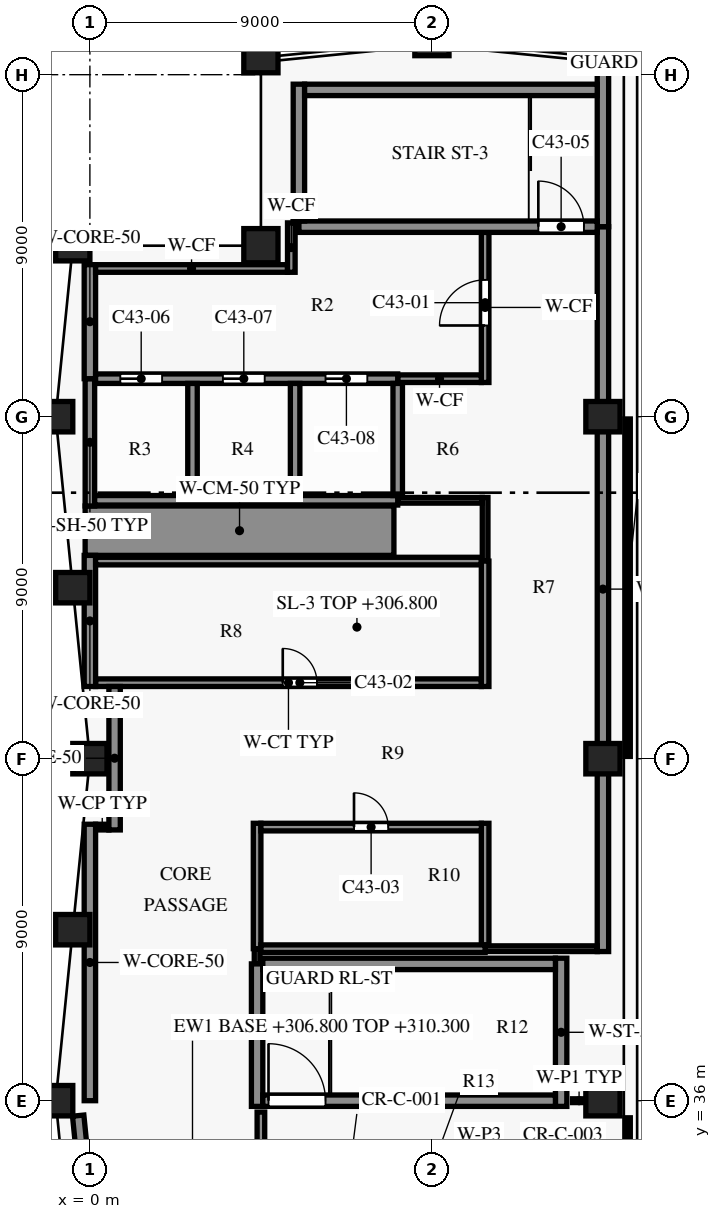
"""IFC4 building model, lengths in metres.
Left out: names, types, materials, properties, quantities, classifications, styles, units other than length and angle.
Written with IfcOpenShell. Run it as: python <this file> out.ifc"""

import sys

from ifc_helpers import new_model, si_unit, direction, frame, frame_2d, origin, origin_2d, place, context, subcontext, project, spatial, rectangle, extrude, element, fill, save


model = new_model("IFC4")
c1 = context("Model", 3, precision=1e-05, world=origin(), true_north=direction((0.0, 1.0)))
c2 = subcontext(c1, "Body", "Model", "MODEL_VIEW")
j1 = project(units=[si_unit("LENGTHUNIT", "METRE"), si_unit("PLANEANGLEUNIT", "RADIAN")], contexts=[c1])
p1 = place(None, origin())
s1 = spatial("IfcSite", under=j1, at=p1, CompositionType="ELEMENT")
p2 = place(p1, origin())
s2 = spatial("IfcBuilding", under=s1, at=p2, CompositionType="ELEMENT")
p3 = place(p2, frame((0.0, 0.0, 306.8)))
s3 = spatial("IfcBuildingStorey", under=s2, at=p3, CompositionType="ELEMENT", Elevation=306.8)
for number, where, z_axis, x_axis in (
    (1, (13.5, 36.0, 0.0), (0.0, 0.0, 1.0), (1.0, 0.0, 0.0)),
    (2, (13.5, 45.0, 0.0), (0.0, 0.0, 1.0), (1.0, 0.0, 0.0)),
    (3, (13.5, 54.0, 0.0), (0.0, 0.0, 1.0), (1.0, 0.0, 0.0)),
    (4, (13.5, 63.45, 0.0), (0.0, 0.0, 1.0), (-0.995, 0.1, 0.0)),
    (5, (9.0, 63.9, 0.0), (0.0, 0.0, 1.0), (-1.0, 0.0, 0.0)),
    (6, (4.5, 63.45, 0.0), (0.0, 0.0, 1.0), (-0.995, -0.1, 0.0)),
    (7, (-0.45, 58.5, 0.0), (0.0, 0.0, 1.0), (-0.1, -0.995, 0.0)),
    (8, (-0.9, 54.0, 0.0), (0.0, 0.0, 1.0), (0.0, -1.0, 0.0)),
    (9, (-0.45, 49.5, 0.0), (0.0, 0.0, 1.0), (0.1, -0.995, 0.0)),
    (10, (0.0, 45.0, 0.0), (0.0, 0.0, 1.0), (0.0, -1.0, 0.0)),
    (11, (-0.45, 40.5, 0.0), (0.0, 0.0, 1.0), (-0.1, -0.995, 0.0)),
    (12, (-0.9, 36.0, 0.0), (0.0, 0.0, 1.0), (0.0, -1.0, 0.0)),
):
    element("IfcColumn", number, at=place(p3, frame(where, z_axis=z_axis, x_axis=x_axis)), inside=s3, PredefinedType="COLUMN", context=c2, shape_type="SweptSolid", body=[
        extrude(rectangle(XDim=0.9, YDim=0.8, at=origin_2d()), origin(), (0.0, 0.0, 1.0), 4.0),
    ])
p4 = place(p3, frame((4.5, 58.5, 0.0), z_axis=(0.0, 0.0, 1.0), x_axis=(1.0, 0.0, 0.0)))
e13 = element("IfcColumn", 13, at=p4, inside=s3, PredefinedType="COLUMN", context=c2, shape_type="SweptSolid", body=[
    extrude(rectangle(XDim=0.9, YDim=0.9, at=origin_2d()), origin(), (0.0, 0.0, 1.0), 4.0),
])
p5 = place(p3, frame((0.061, 31.915, 0.0), z_axis=(0.0, 0.0, 1.0), x_axis=(-0.099549320092, 0.995032629048, 0.0)))
e14 = element("IfcWall", 14, at=p5, inside=s3, PredefinedType="SOLIDWALL", context=c2, shape_type="SweptSolid", body=[
    extrude(rectangle(XDim=3.71, YDim=0.3, at=frame_2d((1.855, 0.0))), origin(), (0.0, 0.0, 1.0), 3.5),
])
p6 = place(p3, frame((4.55, 36.0, 0.0), z_axis=(0.0, 0.0, 1.0), x_axis=(1.0, 0.0, 0.0)))
e15 = element("IfcWall", 15, at=p6, inside=s3, PredefinedType="SHEAR", context=c2, shape_type="SweptSolid", body=[
    extrude(rectangle(XDim=7.7, YDim=0.3, at=frame_2d((3.85, 0.0))), origin(), (0.0, 0.0, 1.0), 3.7),
])
p7 = place(p6, frame((0.15, 0.0, 0.0)))
e16 = element("IfcOpeningElement", 16, at=p7, cuts=e15, PredefinedType="OPENING", context=c2, shape_type="SweptSolid", body=[
    extrude(rectangle(XDim=1.5, YDim=2.2, at=frame_2d((0.75, 1.1))), frame((0.0, 0.16, 0.0), z_axis=(0.0, -1.0, 0.0), x_axis=(1.0, 0.0, 0.0)), (0.0, 0.0, 1.0), 0.32),
])
p8 = place(p3, frame((4.55, 39.6, 0.0), z_axis=(0.0, 0.0, 1.0), x_axis=(1.0, 0.0, 0.0)))
e17 = element("IfcWall", 17, at=p8, inside=s3, PredefinedType="SHEAR", context=c2, shape_type="SweptSolid", body=[
    extrude(rectangle(XDim=7.7, YDim=0.3, at=frame_2d((3.85, 0.0))), origin(), (0.0, 0.0, 1.0), 3.7),
])
p9 = place(p3, frame((10.4, 40.0, 0.0), z_axis=(0.0, 0.0, 1.0), x_axis=(1.0, 0.0, 0.0)))
e18 = element("IfcWall", 18, at=p9, inside=s3, PredefinedType="PARTITIONING", context=c2, shape_type="SweptSolid", body=[
    extrude(rectangle(XDim=2.95, YDim=0.15, at=frame_2d((1.475, 0.0))), origin(), (0.0, 0.0, 1.0), 3.7),
])
p10 = place(p3, frame((4.5, 40.0, 0.0), z_axis=(0.0, 0.0, 1.0), x_axis=(1.0, 0.0, 0.0)))
e19 = element("IfcWall", 19, at=p10, inside=s3, PredefinedType="PARTITIONING", context=c2, shape_type="SweptSolid", body=[
    extrude(rectangle(XDim=5.9, YDim=0.2, at=frame_2d((2.95, 0.0))), origin(), (0.0, 0.0, 1.0), 3.7),
])
p11 = place(p3, frame((0.15, 43.2, 0.0), z_axis=(0.0, 0.0, 1.0), x_axis=(1.0, 0.0, 0.0)))
e20 = element("IfcWall", 20, at=p11, inside=s3, PredefinedType="PARTITIONING", context=c2, shape_type="SweptSolid", body=[
    extrude(rectangle(XDim=0.35, YDim=0.15, at=frame_2d((0.175, 0.0))), origin(), (0.0, 0.0, 1.0), 3.7),
])
p12 = place(p3, frame((4.5, 43.2, 0.0), z_axis=(0.0, 0.0, 1.0), x_axis=(1.0, 0.0, 0.0)))
e21 = element("IfcWall", 21, at=p12, inside=s3, PredefinedType="PARTITIONING", context=c2, shape_type="SweptSolid", body=[
    extrude(rectangle(XDim=5.8, YDim=0.2, at=frame_2d((2.9, 0.0))), origin(), (0.0, 0.0, 1.0), 3.7),
])
p13 = place(p12, frame((2.45, 0.0, 0.0)))
e22 = element("IfcOpeningElement", 22, at=p13, cuts=e21, PredefinedType="OPENING", context=c2, shape_type="SweptSolid", body=[
    extrude(rectangle(XDim=0.9, YDim=2.1, at=frame_2d((0.45, 1.05))), frame((0.0, 0.11, 0.0), z_axis=(0.0, -1.0, 0.0), x_axis=(1.0, 0.0, 0.0)), (0.0, 0.0, 1.0), 0.22),
])
p14 = place(p3, frame((0.15, 47.0, 0.0), z_axis=(0.0, 0.0, 1.0), x_axis=(1.0, 0.0, 0.0)))
e23 = element("IfcWall", 23, at=p14, inside=s3, PredefinedType="PARTITIONING", context=c2, shape_type="SweptSolid", body=[
    extrude(rectangle(XDim=10.15, YDim=0.2, at=frame_2d((5.075, 0.0))), origin(), (0.0, 0.0, 1.0), 3.7),
])
p15 = place(p14, frame((4.925, 0.0, 0.0)))
e24 = element("IfcOpeningElement", 24, at=p15, cuts=e23, PredefinedType="OPENING", context=c2, shape_type="SweptSolid", body=[
    extrude(rectangle(XDim=0.9, YDim=2.1, at=frame_2d((0.45, 1.05))), frame((0.0, 0.11, 0.0), z_axis=(0.0, -1.0, 0.0), x_axis=(1.0, 0.0, 0.0)), (0.0, 0.0, 1.0), 0.22),
])
p16 = place(p3, frame((0.15, 50.2, 0.0), z_axis=(0.0, 0.0, 1.0), x_axis=(1.0, 0.0, 0.0)))
e25 = element("IfcWall", 25, at=p16, inside=s3, PredefinedType="PARTITIONING", context=c2, shape_type="SweptSolid", body=[
    extrude(rectangle(XDim=10.15, YDim=0.2, at=frame_2d((5.075, 0.0))), origin(), (0.0, 0.0, 1.0), 3.7),
])
p17 = place(p3, frame((-0.125, 51.0, 0.0), z_axis=(0.0, 0.0, 1.0), x_axis=(1.0, 0.0, 0.0)))
e26 = element("IfcWall", 26, at=p17, inside=s3, PredefinedType="SHEAR", context=c2, shape_type="SweptSolid", body=[
    extrude(rectangle(XDim=8.125, YDim=1.3, at=frame_2d((4.062, 0.0))), origin(), (0.0, 0.0, 1.0), 3.7),
])
p18 = place(p3, frame((8.1, 51.8, 0.0), z_axis=(0.0, 0.0, 1.0), x_axis=(1.0, 0.0, 0.0)))
e27 = element("IfcWall", 27, at=p18, inside=s3, PredefinedType="PARTITIONING", context=c2, shape_type="SweptSolid", body=[
    extrude(rectangle(XDim=2.225, YDim=0.15, at=frame_2d((1.112, 0.0))), origin(), (0.0, 0.0, 1.0), 3.7),
])
p19 = place(p3, frame((0.125, 51.8, 0.0), z_axis=(0.0, 0.0, 1.0), x_axis=(1.0, 0.0, 0.0)))
e28 = element("IfcWall", 28, at=p19, inside=s3, PredefinedType="SHEAR", context=c2, shape_type="SweptSolid", body=[
    extrude(rectangle(XDim=7.975, YDim=0.25, at=frame_2d((3.988, 0.0))), origin(), (0.0, 0.0, 1.0), 3.7),
])
p20 = place(p3, frame((8.1, 55.0, 0.0), z_axis=(0.0, 0.0, 1.0), x_axis=(1.0, 0.0, 0.0)))
e29 = element("IfcWall", 29, at=p20, inside=s3, PredefinedType="PARTITIONING", context=c2, shape_type="SweptSolid", body=[
    extrude(rectangle(XDim=2.2, YDim=0.2, at=frame_2d((1.1, 0.0))), origin(), (0.0, 0.0, 1.0), 3.7),
])
p21 = place(p3, frame((0.15, 55.0, 0.0), z_axis=(0.0, 0.0, 1.0), x_axis=(1.0, 0.0, 0.0)))
e30 = element("IfcWall", 30, at=p21, inside=s3, PredefinedType="SHEAR", context=c2, shape_type="SweptSolid", body=[
    extrude(rectangle(XDim=7.95, YDim=0.25, at=frame_2d((3.975, 0.0))), origin(), (0.0, 0.0, 1.0), 3.7),
])
p22 = place(p21, frame((0.65, 0.0, 0.0)))
e31 = element("IfcOpeningElement", 31, at=p22, cuts=e30, PredefinedType="OPENING", context=c2, shape_type="SweptSolid", body=[
    extrude(rectangle(XDim=1.1, YDim=2.1, at=frame_2d((0.55, 1.05))), frame((0.0, 0.135, 0.0), z_axis=(0.0, -1.0, 0.0), x_axis=(1.0, 0.0, 0.0)), (0.0, 0.0, 1.0), 0.27),
])
p23 = place(p21, frame((3.35, 0.0, 0.0)))
e32 = element("IfcOpeningElement", 32, at=p23, cuts=e30, PredefinedType="OPENING", context=c2, shape_type="SweptSolid", body=[
    extrude(rectangle(XDim=1.1, YDim=2.1, at=frame_2d((0.55, 1.05))), frame((0.0, 0.135, 0.0), z_axis=(0.0, -1.0, 0.0), x_axis=(1.0, 0.0, 0.0)), (0.0, 0.0, 1.0), 0.27),
])
p24 = place(p21, frame((6.05, 0.0, 0.0)))
e33 = element("IfcOpeningElement", 33, at=p24, cuts=e30, PredefinedType="OPENING", context=c2, shape_type="SweptSolid", body=[
    extrude(rectangle(XDim=1.1, YDim=2.1, at=frame_2d((0.55, 1.05))), frame((0.0, 0.135, 0.0), z_axis=(0.0, -1.0, 0.0), x_axis=(1.0, 0.0, 0.0)), (0.0, 0.0, 1.0), 0.27),
])
p25 = place(p3, frame((0.15, 57.9, 0.0), z_axis=(0.0, 0.0, 1.0), x_axis=(1.0, 0.0, 0.0)))
e34 = element("IfcWall", 34, at=p25, inside=s3, PredefinedType="PARTITIONING", context=c2, shape_type="SweptSolid", body=[
    extrude(rectangle(XDim=5.05, YDim=0.2, at=frame_2d((2.525, 0.0))), origin(), (0.0, 0.0, 1.0), 3.7),
])
p26 = place(p3, frame((5.5, 59.0, 0.0), z_axis=(0.0, 0.0, 1.0), x_axis=(1.0, 0.0, 0.0)))
e35 = element("IfcWall", 35, at=p26, inside=s3, PredefinedType="SHEAR", context=c2, shape_type="SweptSolid", body=[
    extrude(rectangle(XDim=7.85, YDim=0.3, at=frame_2d((3.925, 0.0))), origin(), (0.0, 0.0, 1.0), 3.7),
])
p27 = place(p26, frame((6.3, 0.0, 0.0)))
e36 = element("IfcOpeningElement", 36, at=p27, cuts=e35, PredefinedType="OPENING", context=c2, shape_type="SweptSolid", body=[
    extrude(rectangle(XDim=1.2, YDim=2.2, at=frame_2d((0.6, 1.1))), frame((0.0, 0.16, 0.0), z_axis=(0.0, -1.0, 0.0), x_axis=(1.0, 0.0, 0.0)), (0.0, 0.0, 1.0), 0.32),
])
p28 = place(p3, frame((5.65, 62.6, 0.0), z_axis=(0.0, 0.0, 1.0), x_axis=(1.0, 0.0, 0.0)))
e37 = element("IfcWall", 37, at=p28, inside=s3, PredefinedType="SHEAR", context=c2, shape_type="SweptSolid", body=[
    extrude(rectangle(XDim=7.7, YDim=0.3, at=frame_2d((3.85, 0.0))), origin(), (0.0, 0.0, 1.0), 3.7),
])
p29 = place(p3, frame((0.0, 36.0, 0.0), z_axis=(0.0, 0.0, 1.0), x_axis=(0.0, 1.0, 0.0)))
e38 = element("IfcWall", 38, at=p29, inside=s3, PredefinedType="SHEAR", context=c2, shape_type="SweptSolid", body=[
    extrude(rectangle(XDim=7.275, YDim=0.3, at=frame_2d((3.637, 0.0))), origin(), (0.0, 0.0, 1.0), 3.7),
])
p30 = place(p3, frame((0.0, 46.9, 0.0), z_axis=(0.0, 0.0, 1.0), x_axis=(0.0, 1.0, 0.0)))
e39 = element("IfcWall", 39, at=p30, inside=s3, PredefinedType="SHEAR", context=c2, shape_type="SweptSolid", body=[
    extrude(rectangle(XDim=3.45, YDim=0.3, at=frame_2d((1.725, 0.0))), origin(), (0.0, 0.0, 1.0), 3.7),
])
p31 = place(p3, frame((0.0, 55.0, 0.0), z_axis=(0.0, 0.0, 1.0), x_axis=(0.0, 1.0, 0.0)))
e40 = element("IfcWall", 40, at=p31, inside=s3, PredefinedType="SHEAR", context=c2, shape_type="SweptSolid", body=[
    extrude(rectangle(XDim=3.0, YDim=0.3, at=frame_2d((1.5, 0.0))), origin(), (0.0, 0.0, 1.0), 3.7),
])
p32 = place(p3, frame((0.0, 51.65, 0.0), z_axis=(0.0, 0.0, 1.0), x_axis=(0.0, 1.0, 0.0)))
e41 = element("IfcWall", 41, at=p32, inside=s3, PredefinedType="SHEAR", context=c2, shape_type="SweptSolid", body=[
    extrude(rectangle(XDim=3.35, YDim=0.25, at=frame_2d((1.675, 0.0))), origin(), (0.0, 0.0, 1.0), 3.7),
])
p33 = place(p3, frame((0.65, 43.125, 0.0), z_axis=(0.0, 0.0, 1.0), x_axis=(0.0, 1.0, 0.0)))
e42 = element("IfcWall", 42, at=p33, inside=s3, PredefinedType="SHEAR", context=c2, shape_type="SweptSolid", body=[
    extrude(rectangle(XDim=3.775, YDim=0.3, at=frame_2d((1.887, 0.0))), origin(), (0.0, 0.0, 1.0), 3.7),
])
p34 = place(p3, frame((2.7, 51.925, 0.0), z_axis=(0.0, 0.0, 1.0), x_axis=(0.0, 1.0, 0.0)))
e43 = element("IfcWall", 43, at=p34, inside=s3, PredefinedType="SHEAR", context=c2, shape_type="SweptSolid", body=[
    extrude(rectangle(XDim=2.95, YDim=0.25, at=frame_2d((1.475, 0.0))), origin(), (0.0, 0.0, 1.0), 3.7),
])
p35 = place(p3, frame((4.4, 39.6, 0.0), z_axis=(0.0, 0.0, 1.0), x_axis=(0.0, 1.0, 0.0)))
e44 = element("IfcWall", 44, at=p35, inside=s3, PredefinedType="PARTITIONING", context=c2, shape_type="SweptSolid", body=[
    extrude(rectangle(XDim=0.4, YDim=0.15, at=frame_2d((0.2, 0.0))), origin(), (0.0, 0.0, 1.0), 3.7),
])
p36 = place(p3, frame((4.4, 40.0, 0.0), z_axis=(0.0, 0.0, 1.0), x_axis=(0.0, 1.0, 0.0)))
e45 = element("IfcWall", 45, at=p36, inside=s3, PredefinedType="PARTITIONING", context=c2, shape_type="SweptSolid", body=[
    extrude(rectangle(XDim=3.3, YDim=0.2, at=frame_2d((1.65, 0.0))), origin(), (0.0, 0.0, 1.0), 3.7),
])
p37 = place(p3, frame((4.4, 35.85, 0.0), z_axis=(0.0, 0.0, 1.0), x_axis=(0.0, 1.0, 0.0)))
e46 = element("IfcWall", 46, at=p37, inside=s3, PredefinedType="SHEAR", context=c2, shape_type="SweptSolid", body=[
    extrude(rectangle(XDim=3.75, YDim=0.3, at=frame_2d((1.875, 0.0))), origin(), (0.0, 0.0, 1.0), 3.7),
])
p38 = place(p3, frame((5.3, 57.8, 0.0), z_axis=(0.0, 0.0, 1.0), x_axis=(0.0, 1.0, 0.0)))
e47 = element("IfcWall", 47, at=p38, inside=s3, PredefinedType="PARTITIONING", context=c2, shape_type="SweptSolid", body=[
    extrude(rectangle(XDim=1.3, YDim=0.2, at=frame_2d((0.65, 0.0))), origin(), (0.0, 0.0, 1.0), 3.7),
])
p39 = place(p3, frame((5.4, 51.925, 0.0), z_axis=(0.0, 0.0, 1.0), x_axis=(0.0, 1.0, 0.0)))
e48 = element("IfcWall", 48, at=p39, inside=s3, PredefinedType="SHEAR", context=c2, shape_type="SweptSolid", body=[
    extrude(rectangle(XDim=2.95, YDim=0.25, at=frame_2d((1.475, 0.0))), origin(), (0.0, 0.0, 1.0), 3.7),
])
p40 = place(p3, frame((5.5, 59.15, 0.0), z_axis=(0.0, 0.0, 1.0), x_axis=(0.0, 1.0, 0.0)))
e49 = element("IfcWall", 49, at=p40, inside=s3, PredefinedType="SHEAR", context=c2, shape_type="SweptSolid", body=[
    extrude(rectangle(XDim=3.6, YDim=0.3, at=frame_2d((1.8, 0.0))), origin(), (0.0, 0.0, 1.0), 3.7),
])
p41 = place(p3, frame((8.1, 51.925, 0.0), z_axis=(0.0, 0.0, 1.0), x_axis=(0.0, 1.0, 0.0)))
e50 = element("IfcWall", 50, at=p41, inside=s3, PredefinedType="SHEAR", context=c2, shape_type="SweptSolid", body=[
    extrude(rectangle(XDim=2.95, YDim=0.25, at=frame_2d((1.475, 0.0))), origin(), (0.0, 0.0, 1.0), 3.7),
])
p42 = place(p3, frame((10.4, 54.9, 0.0), z_axis=(0.0, 0.0, 1.0), x_axis=(0.0, 1.0, 0.0)))
e51 = element("IfcWall", 51, at=p42, inside=s3, PredefinedType="PARTITIONING", context=c2, shape_type="SweptSolid", body=[
    extrude(rectangle(XDim=3.95, YDim=0.2, at=frame_2d((1.975, 0.0))), origin(), (0.0, 0.0, 1.0), 3.7),
])
p43 = place(p42, frame((1.5, 0.0, 0.0)))
e52 = element("IfcOpeningElement", 52, at=p43, cuts=e51, PredefinedType="OPENING", context=c2, shape_type="SweptSolid", body=[
    extrude(rectangle(XDim=1.2, YDim=2.2, at=frame_2d((0.6, 1.1))), frame((0.0, 0.11, 0.0), z_axis=(0.0, -1.0, 0.0), x_axis=(1.0, 0.0, 0.0)), (0.0, 0.0, 1.0), 0.22),
])
p44 = place(p3, frame((10.4, 50.2, 0.0), z_axis=(0.0, 0.0, 1.0), x_axis=(0.0, 1.0, 0.0)))
e53 = element("IfcWall", 53, at=p44, inside=s3, PredefinedType="PARTITIONING", context=c2, shape_type="SweptSolid", body=[
    extrude(rectangle(XDim=1.675, YDim=0.15, at=frame_2d((0.837, 0.0))), origin(), (0.0, 0.0, 1.0), 3.7),
])
p45 = place(p3, frame((10.4, 40.1, 0.0), z_axis=(0.0, 0.0, 1.0), x_axis=(0.0, 1.0, 0.0)))
e54 = element("IfcWall", 54, at=p45, inside=s3, PredefinedType="PARTITIONING", context=c2, shape_type="SweptSolid", body=[
    extrude(rectangle(XDim=3.2, YDim=0.2, at=frame_2d((1.6, 0.0))), origin(), (0.0, 0.0, 1.0), 3.7),
])
p46 = place(p3, frame((10.4, 46.9, 0.0), z_axis=(0.0, 0.0, 1.0), x_axis=(0.0, 1.0, 0.0)))
e55 = element("IfcWall", 55, at=p46, inside=s3, PredefinedType="PARTITIONING", context=c2, shape_type="SweptSolid", body=[
    extrude(rectangle(XDim=3.3, YDim=0.2, at=frame_2d((1.65, 0.0))), origin(), (0.0, 0.0, 1.0), 3.7),
])
p47 = place(p3, frame((12.4, 35.85, 0.0), z_axis=(0.0, 0.0, 1.0), x_axis=(0.0, 1.0, 0.0)))
e56 = element("IfcWall", 56, at=p47, inside=s3, PredefinedType="SHEAR", context=c2, shape_type="SweptSolid", body=[
    extrude(rectangle(XDim=3.9, YDim=0.3, at=frame_2d((1.95, 0.0))), origin(), (0.0, 0.0, 1.0), 3.7),
])
p48 = place(p3, frame((13.5, 39.925, 0.0), z_axis=(0.0, 0.0, 1.0), x_axis=(0.0, 1.0, 0.0)))
e57 = element("IfcWall", 57, at=p48, inside=s3, PredefinedType="SHEAR", context=c2, shape_type="SweptSolid", body=[
    extrude(rectangle(XDim=19.075, YDim=0.3, at=frame_2d((9.538, 0.0))), origin(), (0.0, 0.0, 1.0), 3.7),
])
p49 = place(p3, frame((13.5, 59.0, 0.0), z_axis=(0.0, 0.0, 1.0), x_axis=(0.0, 1.0, 0.0)))
e58 = element("IfcWall", 58, at=p49, inside=s3, PredefinedType="SHEAR", context=c2, shape_type="SweptSolid", body=[
    extrude(rectangle(XDim=4.048, YDim=0.3, at=frame_2d((2.024, 0.0))), origin(), (0.0, 0.0, 1.0), 3.7),
])
p50 = place(p3, frame((4.5, 33.6, 0.0), z_axis=(0.0, 0.0, 1.0), x_axis=(0.0, 1.0, 0.0)))
e59 = element("IfcWall", 59, at=p50, inside=s3, PredefinedType="PARTITIONING", context=c2, shape_type="SweptSolid", body=[
    extrude(rectangle(XDim=2.1, YDim=0.2, at=frame_2d((1.05, 0.0))), origin(), (0.0, 0.0, 1.0), 3.68),
])
p51 = place(p3, frame((12.7, 36.0, 0.0), z_axis=(0.0, 0.0, 1.0), x_axis=(1.0, 0.0, 0.0)))
e60 = element("IfcWall", 60, at=p51, inside=s3, PredefinedType="PARTITIONING", context=c2, shape_type="SweptSolid", body=[
    extrude(rectangle(XDim=0.345, YDim=0.1, at=frame_2d((0.172, 0.0))), origin(), (0.0, 0.0, 1.0), 3.68),
])
p52 = place(p43, origin())
e61 = element("IfcDoor", 61, at=p52, inside=s3, OperationType="SINGLE_SWING_RIGHT", PredefinedType="DOOR", context=c2, shape_type="SweptSolid", body=[
    extrude(rectangle(XDim=1.2, YDim=2.2, at=frame_2d((0.6, 1.1))), frame((0.0, 0.025, 0.0), z_axis=(0.0, -1.0, 0.0), x_axis=(1.0, 0.0, 0.0)), (0.0, 0.0, 1.0), 0.05),
])
fill(e52, e61)
p53 = place(p15, origin())
e62 = element("IfcDoor", 62, at=p53, inside=s3, OperationType="SINGLE_SWING_RIGHT", PredefinedType="DOOR", context=c2, shape_type="SweptSolid", body=[
    extrude(rectangle(XDim=0.9, YDim=2.1, at=frame_2d((0.45, 1.05))), frame((0.0, 0.025, 0.0), z_axis=(0.0, -1.0, 0.0), x_axis=(1.0, 0.0, 0.0)), (0.0, 0.0, 1.0), 0.05),
])
fill(e24, e62)
p54 = place(p13, origin())
e63 = element("IfcDoor", 63, at=p54, inside=s3, OperationType="SINGLE_SWING_LEFT", PredefinedType="DOOR", context=c2, shape_type="SweptSolid", body=[
    extrude(rectangle(XDim=0.9, YDim=2.1, at=frame_2d((0.45, 1.05))), frame((0.0, 0.025, 0.0), z_axis=(0.0, -1.0, 0.0), x_axis=(1.0, 0.0, 0.0)), (0.0, 0.0, 1.0), 0.05),
])
fill(e22, e63)
p55 = place(p7, origin())
e64 = element("IfcDoor", 64, at=p55, inside=s3, OperationType="SINGLE_SWING_RIGHT", PredefinedType="DOOR", context=c2, shape_type="SweptSolid", body=[
    extrude(rectangle(XDim=1.5, YDim=2.2, at=frame_2d((0.75, 1.1))), frame((0.0, 0.025, 0.0), z_axis=(0.0, -1.0, 0.0), x_axis=(1.0, 0.0, 0.0)), (0.0, 0.0, 1.0), 0.05),
])
fill(e16, e64)
p56 = place(p27, origin())
e65 = element("IfcDoor", 65, at=p56, inside=s3, OperationType="SINGLE_SWING_RIGHT", PredefinedType="DOOR", context=c2, shape_type="SweptSolid", body=[
    extrude(rectangle(XDim=1.2, YDim=2.2, at=frame_2d((0.6, 1.1))), frame((0.0, 0.025, 0.0), z_axis=(0.0, -1.0, 0.0), x_axis=(1.0, 0.0, 0.0)), (0.0, 0.0, 1.0), 0.05),
])
fill(e36, e65)
p57 = place(p22, origin())
e66 = element("IfcDoor", 66, at=p57, inside=s3, OperationType="DOUBLE_DOOR_SLIDING", PredefinedType="DOOR", context=c2, shape_type="SweptSolid", body=[
    extrude(rectangle(XDim=1.1, YDim=2.1, at=frame_2d((0.55, 1.05))), frame((0.0, 0.025, 0.0), z_axis=(0.0, -1.0, 0.0), x_axis=(1.0, 0.0, 0.0)), (0.0, 0.0, 1.0), 0.05),
])
fill(e31, e66)
p58 = place(p23, origin())
e67 = element("IfcDoor", 67, at=p58, inside=s3, OperationType="DOUBLE_DOOR_SLIDING", PredefinedType="DOOR", context=c2, shape_type="SweptSolid", body=[
    extrude(rectangle(XDim=1.1, YDim=2.1, at=frame_2d((0.55, 1.05))), frame((0.0, 0.025, 0.0), z_axis=(0.0, -1.0, 0.0), x_axis=(1.0, 0.0, 0.0)), (0.0, 0.0, 1.0), 0.05),
])
fill(e32, e67)
p59 = place(p24, origin())
e68 = element("IfcDoor", 68, at=p59, inside=s3, OperationType="DOUBLE_DOOR_SLIDING", PredefinedType="DOOR", context=c2, shape_type="SweptSolid", body=[
    extrude(rectangle(XDim=1.1, YDim=2.1, at=frame_2d((0.55, 1.05))), frame((0.0, 0.025, 0.0), z_axis=(0.0, -1.0, 0.0), x_axis=(1.0, 0.0, 0.0)), (0.0, 0.0, 1.0), 0.05),
])
fill(e33, e68)
save(model, sys.argv[1])
